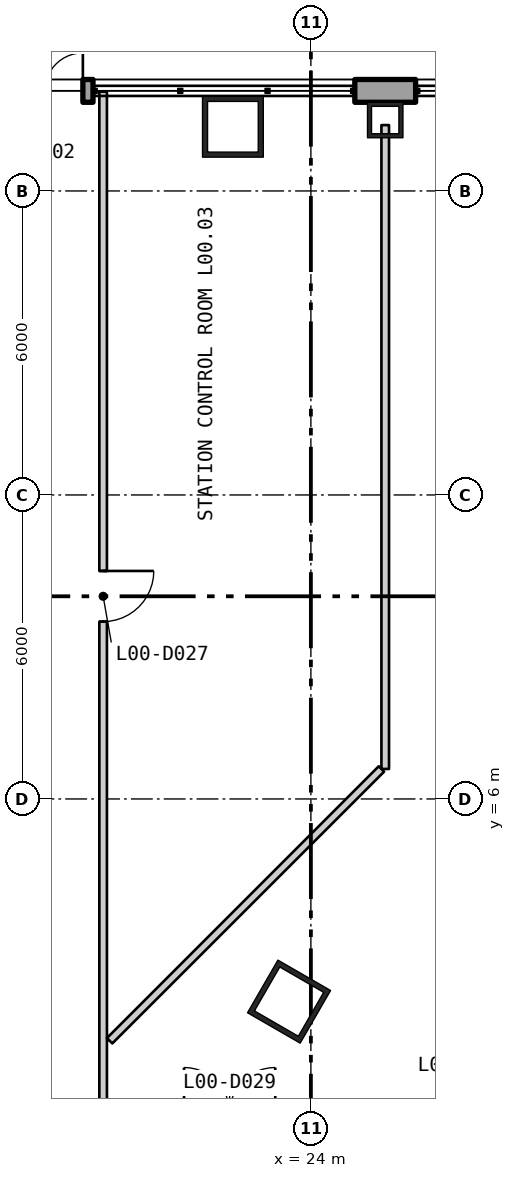
"""IFC4 building model, lengths in metres.
Left out: names, types, materials, properties, quantities, classifications, styles, units other than length and angle.
Written with IfcOpenShell. Run it as: python <this file> out.ifc"""

import sys

from ifc_helpers import new_model, si_unit, direction, frame, frame_2d, origin, origin_2d, place, context, subcontext, project, spatial, polyline, rectangle, hollow_rectangle, outline, extrude, element, fill, save


model = new_model("IFC4")
c1 = context("Model", 3, precision=1e-05, world=origin(), true_north=direction((0.0, 1.0)))
c2 = subcontext(c1, "Body", "Model", "MODEL_VIEW")
j1 = project(units=[si_unit("LENGTHUNIT", "METRE"), si_unit("PLANEANGLEUNIT", "RADIAN")], contexts=[c1])
p1 = place(None, origin())
s1 = spatial("IfcSite", under=j1, at=p1, CompositionType="ELEMENT")
p2 = place(p1, origin())
s2 = spatial("IfcBuilding", under=s1, at=p2, CompositionType="ELEMENT")
p3 = place(p2, origin())
s3 = spatial("IfcBuildingStorey", under=s2, at=p3, CompositionType="ELEMENT", Elevation=0.0)
for number, where, z_axis, x_axis in (
    (1, (22.461, 19.267, 0.0), (0.0, 0.0, 1.0), (-1.0, 0.0, 0.0)),
    (2, (23.569, 2.0, 0.0), (0.0, 0.0, 1.0), (0.5, 0.866, 0.0)),
):
    element("IfcColumn", number, at=place(p3, frame(where, z_axis=z_axis, x_axis=x_axis)), inside=s3, PredefinedType="COLUMN", context=c2, shape_type="SweptSolid", body=[
        extrude(hollow_rectangle(XDim=1.2, YDim=1.2, WallThickness=0.1, at=origin_2d()), origin(), (0.0, 0.0, 1.0), 8.4),
    ])
p4 = place(p3, frame((25.467, 19.4, 0.0), z_axis=(0.0, 0.0, 1.0), x_axis=(-1.0, 0.0, 0.0)))
e3 = element("IfcColumn", 3, at=p4, inside=s3, PredefinedType="COLUMN", context=c2, shape_type="SweptSolid", body=[
    extrude(hollow_rectangle(XDim=0.7, YDim=0.7, WallThickness=0.08, at=origin_2d()), origin(), (0.0, 0.0, 1.0), 8.4),
])
p5 = place(p3, frame((38.775, 19.975, 5.4), z_axis=(0.0, 0.0, 1.0), x_axis=(-1.0, 0.0, 0.0)))
e4 = element("IfcWall", 4, at=p5, inside=s3, PredefinedType="SOLIDWALL", context=c2, shape_type="SweptSolid", body=[
    extrude(outline(polyline([(-0.225, -0.225), (77.775, -0.225), (77.325, 0.225), (0.225, 0.225), (-0.225, -0.225)])), origin(), (0.0, 0.0, 1.0), 2.6),
])
p6 = place(p3, frame((26.067, 19.975, -0.4), z_axis=(0.0, 0.0, 1.0), x_axis=(-1.0, 0.0, 0.0)))
e5 = element("IfcWall", 5, at=p6, inside=s3, PredefinedType="SOLIDWALL", context=c2, shape_type="SweptSolid", body=[
    extrude(outline(polyline([(0.0, -0.225), (1.2, -0.225), (1.2, 0.225), (0.0, 0.225), (0.0, -0.225)])), origin(), (0.0, 0.0, 1.0), 5.8),
])
p7 = place(p3, frame((19.7, 19.975, -0.4), z_axis=(0.0, 0.0, 1.0), x_axis=(-1.0, 0.0, 0.0)))
e6 = element("IfcWall", 6, at=p7, inside=s3, PredefinedType="SOLIDWALL", context=c2, shape_type="SweptSolid", body=[
    extrude(outline(polyline([(0.0, -0.225), (0.1, -0.225), (0.1, 0.225), (0.0, 0.225), (0.0, -0.225)])), origin(), (0.0, 0.0, 1.0), 5.8),
])
p8 = place(p3, frame((31.233, 19.975, -0.4), z_axis=(0.0, 0.0, 1.0), x_axis=(-1.0, 0.0, 0.0)))
e7 = element("IfcWall", 7, at=p8, inside=s3, PredefinedType="SOLIDWALL", context=c2, shape_type="SweptSolid", body=[
    extrude(outline(polyline([(0.0, -0.225), (5.167, -0.225), (5.167, 0.225), (0.0, 0.225), (0.0, -0.225)])), origin(), (0.0, 0.0, 1.0), 1.0),
])
p9 = place(p3, frame((24.867, 19.975, -0.4), z_axis=(0.0, 0.0, 1.0), x_axis=(-1.0, 0.0, 0.0)))
e8 = element("IfcWall", 8, at=p9, inside=s3, PredefinedType="SOLIDWALL", context=c2, shape_type="SweptSolid", body=[
    extrude(outline(polyline([(0.0, -0.225), (5.167, -0.225), (5.167, 0.225), (0.0, 0.225), (0.0, -0.225)])), origin(), (0.0, 0.0, 1.0), 1.0),
])
p10 = place(p3, frame((19.6, 19.975, -0.4), z_axis=(0.0, 0.0, 1.0), x_axis=(-1.0, 0.0, 0.0)))
e9 = element("IfcWall", 9, at=p10, inside=s3, PredefinedType="SOLIDWALL", context=c2, shape_type="SweptSolid", body=[
    extrude(outline(polyline([(0.0, -0.225), (6.267, -0.225), (6.267, 0.225), (0.0, 0.225), (0.0, -0.225)])), origin(), (0.0, 0.0, 1.0), 5.8),
])
p11 = place(p10, frame((0.1, 0.0, 0.4)))
e10 = element("IfcOpeningElement", 10, at=p11, cuts=e9, PredefinedType="OPENING", context=c2, shape_type="SweptSolid", body=[
    extrude(rectangle(XDim=1.5, YDim=2.4, at=frame_2d((0.75, 1.2))), frame((0.0, 0.235, 0.0), z_axis=(0.0, -1.0, 0.0), x_axis=(1.0, 0.0, 0.0)), (0.0, 0.0, 1.0), 0.47),
])
p12 = place(p3, frame((19.9, -0.211, 0.0), z_axis=(0.0, 0.0, 1.0), x_axis=(0.0, 1.0, 0.0)))
e11 = element("IfcWall", 11, at=p12, inside=s3, PredefinedType="PARTITIONING", context=c2, shape_type="SweptSolid", body=[
    extrude(rectangle(XDim=20.171, YDim=0.15, at=frame_2d((10.085, 0.0))), origin(), (0.0, 0.0, 1.0), 8.18),
])
p13 = place(p12, frame((9.711, 0.0, 0.0)))
e12 = element("IfcOpeningElement", 12, at=p13, cuts=e11, PredefinedType="OPENING", context=c2, shape_type="SweptSolid", body=[
    extrude(rectangle(XDim=1.0, YDim=2.1, at=frame_2d((0.5, 1.05))), frame((0.0, 0.085, 0.0), z_axis=(0.0, -1.0, 0.0), x_axis=(1.0, 0.0, 0.0)), (0.0, 0.0, 1.0), 0.17),
])
p14 = place(p3, frame((20.028, 1.228, 0.0), z_axis=(0.0, 0.0, 1.0), x_axis=(0.707106781187, 0.707106781187, 0.0)))
e13 = element("IfcWall", 13, at=p14, inside=s3, PredefinedType="PARTITIONING", context=c2, shape_type="SweptSolid", body=[
    extrude(rectangle(XDim=7.586, YDim=0.15, at=frame_2d((3.793, 0.0))), origin(), (0.0, 0.0, 1.0), 8.18),
])
p15 = place(p3, frame((25.467, 6.592, 0.0), z_axis=(0.0, 0.0, 1.0), x_axis=(0.0, 1.0, 0.0)))
e14 = element("IfcWall", 14, at=p15, inside=s3, PredefinedType="PARTITIONING", context=c2, shape_type="SweptSolid", body=[
    extrude(rectangle(XDim=7.736, YDim=0.15, at=frame_2d((3.868, 0.0))), origin(), (0.0, 0.0, 1.0), 8.18),
])
p16 = place(p3, frame((25.467, 14.328, 0.0), z_axis=(0.0, 0.0, 1.0), x_axis=(0.0, 1.0, 0.0)))
e15 = element("IfcWall", 15, at=p16, inside=s3, PredefinedType="PARTITIONING", context=c2, shape_type="SweptSolid", body=[
    extrude(rectangle(XDim=4.972, YDim=0.15, at=frame_2d((2.486, 0.0))), origin(), (0.0, 0.0, 1.0), 7.58),
])
p17 = place(p11, frame((1.5, 0.0, 0.0), z_axis=(0.0, 0.0, 1.0), x_axis=(-1.0, 0.0, 0.0)))
e16 = element("IfcDoor", 16, at=p17, inside=s3, OperationType="DOUBLE_DOOR_SINGLE_SWING", PredefinedType="DOOR", context=c2, shape_type="SweptSolid", body=[
    extrude(rectangle(XDim=1.5, YDim=2.4, at=frame_2d((0.75, 1.2))), frame((0.0, 0.025, 0.0), z_axis=(0.0, -1.0, 0.0), x_axis=(1.0, 0.0, 0.0)), (0.0, 0.0, 1.0), 0.05),
])
fill(e10, e16)
p18 = place(p13, origin())
e17 = element("IfcDoor", 17, at=p18, inside=s3, OperationType="SINGLE_SWING_RIGHT", PredefinedType="DOOR", context=c2, shape_type="SweptSolid", body=[
    extrude(rectangle(XDim=1.0, YDim=2.1, at=frame_2d((0.5, 1.05))), frame((0.0, 0.025, 0.0), z_axis=(0.0, -1.0, 0.0), x_axis=(1.0, 0.0, 0.0)), (0.0, 0.0, 1.0), 0.05),
])
fill(e12, e17)
save(model, sys.argv[1])
